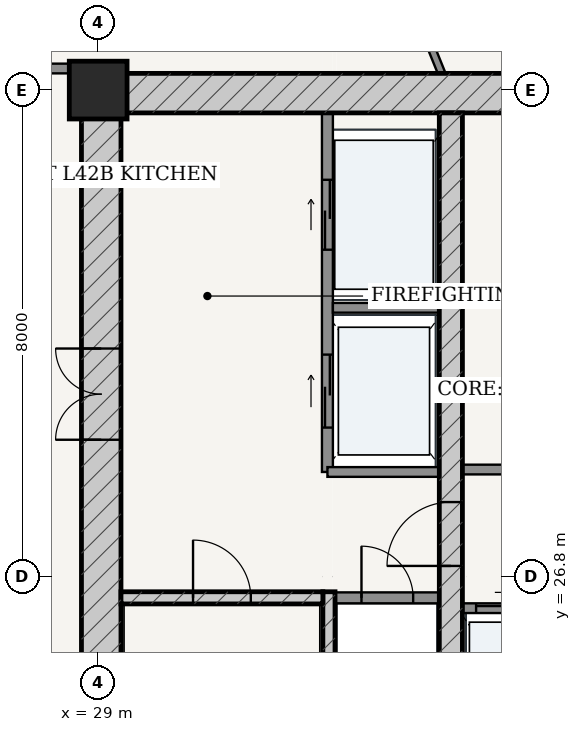
"""IFC4 building model, lengths in metres.
Left out: names, types, materials, properties, quantities, classifications, styles, units other than length and angle.
Written with IfcOpenShell. Run it as: python <this file> out.ifc"""

import sys

from ifc_helpers import new_model, si_unit, direction, frame, frame_2d, origin, origin_2d, place, context, subcontext, project, spatial, rectangle, extrude, source, transform, mapped, element, fill, save


model = new_model("IFC4")
c1 = context("Model", 3, precision=1e-05, world=origin(), true_north=direction((-0.2419218956, 0.970295726276)))
c2 = subcontext(c1, "Body", "Model", "MODEL_VIEW")
j1 = project(units=[si_unit("LENGTHUNIT", "METRE"), si_unit("PLANEANGLEUNIT", "RADIAN")], contexts=[c1])
p1 = place(None, origin())
s1 = spatial("IfcSite", under=j1, at=p1, CompositionType="ELEMENT")
p2 = place(p1, origin())
s2 = spatial("IfcBuilding", under=s1, at=p2, CompositionType="ELEMENT")
p3 = place(p2, frame((0.0, 0.0, 160.6)))
s3 = spatial("IfcBuildingStorey", under=s2, at=p3, CompositionType="ELEMENT", Elevation=160.6)
p4 = place(p3, frame((29.0, 34.8, 0.0), z_axis=(0.0, 0.0, 1.0), x_axis=(1.0, 0.0, 0.0)))
e1 = element("IfcColumn", 1, at=p4, inside=s3, PredefinedType="COLUMN", context=c2, shape_type="SweptSolid", body=[
    extrude(rectangle(XDim=0.95, YDim=0.95, at=origin_2d()), origin(), (0.0, 0.0, 1.0), 3.6),
])
p5 = place(p3, frame((28.725, 34.75, 0.0), z_axis=(0.0, 0.0, 1.0), x_axis=(1.0, 0.0, 0.0)))
e2 = element("IfcWall", 2, at=p5, inside=s3, PredefinedType="SHEAR", context=c2, shape_type="SweptSolid", body=[
    extrude(rectangle(XDim=18.55, YDim=0.65, at=frame_2d((9.275, 0.0))), origin(), (0.0, 0.0, 1.0), 3.33),
])
p6 = place(p3, frame((29.05, 19.175, 0.0), z_axis=(0.0, 0.0, 1.0), x_axis=(0.0, 1.0, 0.0)))
e3 = element("IfcWall", 3, at=p6, inside=s3, PredefinedType="SHEAR", context=c2, shape_type="SweptSolid", body=[
    extrude(rectangle(XDim=15.25, YDim=0.65, at=frame_2d((7.625, 0.0))), origin(), (0.0, 0.0, 1.0), 3.33),
])
p7 = place(p6, frame((9.875, 0.0, 0.0)))
e4 = element("IfcOpeningElement", 4, at=p7, cuts=e3, PredefinedType="OPENING", context=c2, shape_type="SweptSolid", body=[
    extrude(rectangle(XDim=1.5, YDim=2.2, at=frame_2d((0.75, 1.1))), frame((0.0, 0.335, 0.0), z_axis=(0.0, -1.0, 0.0), x_axis=(1.0, 0.0, 0.0)), (0.0, 0.0, 1.0), 0.67),
])
p8 = place(p3, frame((32.795, 19.175, 0.0), z_axis=(0.0, 0.0, 1.0), x_axis=(0.0, 1.0, 0.0)))
e5 = element("IfcWall", 5, at=p8, inside=s3, PredefinedType="SOLIDWALL", context=c2, shape_type="SweptSolid", body=[
    extrude(rectangle(XDim=7.375, YDim=0.2, at=frame_2d((3.688, 0.0))), origin(), (0.0, 0.0, 1.0), 3.33),
])
p9 = place(p3, frame((29.375, 26.45, 0.0), z_axis=(0.0, 0.0, 1.0), x_axis=(1.0, 0.0, 0.0)))
e6 = element("IfcWall", 6, at=p9, inside=s3, PredefinedType="SOLIDWALL", context=c2, shape_type="SweptSolid", body=[
    extrude(rectangle(XDim=3.32, YDim=0.2, at=frame_2d((1.66, 0.0))), origin(), (0.0, 0.0, 1.0), 3.33),
])
p10 = place(p9, frame((1.185, 0.0, 0.0)))
e7 = element("IfcOpeningElement", 7, at=p10, cuts=e6, PredefinedType="OPENING", context=c2, shape_type="SweptSolid", body=[
    extrude(rectangle(XDim=0.95, YDim=2.15, at=frame_2d((0.475, 1.075))), frame((0.0, 0.11, 0.0), z_axis=(0.0, -1.0, 0.0), x_axis=(1.0, 0.0, 0.0)), (0.0, 0.0, 1.0), 0.22),
])
p11 = place(p3, frame((34.8, 19.175, 0.0), z_axis=(0.0, 0.0, 1.0), x_axis=(0.0, 1.0, 0.0)))
e8 = element("IfcWall", 8, at=p11, inside=s3, PredefinedType="SHEAR", context=c2, shape_type="SweptSolid", body=[
    extrude(rectangle(XDim=15.25, YDim=0.38, at=frame_2d((7.625, 0.0))), origin(), (0.0, 0.0, 1.0), 3.33),
])
p12 = place(p11, frame((7.8, 0.0, 0.0)))
e9 = element("IfcOpeningElement", 9, at=p12, cuts=e8, PredefinedType="OPENING", context=c2, shape_type="SweptSolid", body=[
    extrude(rectangle(XDim=1.05, YDim=2.15, at=frame_2d((0.525, 1.075))), frame((0.0, 0.2, 0.0), z_axis=(0.0, -1.0, 0.0), x_axis=(1.0, 0.0, 0.0)), (0.0, 0.0, 1.0), 0.4),
])
p13 = place(p3, frame((32.9, 26.45, 0.0), z_axis=(0.0, 0.0, 1.0), x_axis=(1.0, 0.0, 0.0)))
e10 = element("IfcWall", 10, at=p13, inside=s3, PredefinedType="PARTITIONING", context=c2, shape_type="SweptSolid", body=[
    extrude(rectangle(XDim=1.71, YDim=0.18, at=frame_2d((0.855, 0.0))), origin(), (0.0, 0.0, 1.0), 3.33),
])
p14 = place(p13, frame((0.43, 0.0, 0.0)))
e11 = element("IfcOpeningElement", 11, at=p14, cuts=e10, PredefinedType="OPENING", context=c2, shape_type="SweptSolid", body=[
    extrude(rectangle(XDim=0.85, YDim=2.1, at=frame_2d((0.425, 1.05))), frame((0.0, 0.1, 0.0), z_axis=(0.0, -1.0, 0.0), x_axis=(1.0, 0.0, 0.0)), (0.0, 0.0, 1.0), 0.2),
])
p15 = place(p3, frame((32.77, 28.52, 0.0), z_axis=(0.0, 0.0, 1.0), x_axis=(0.0, 1.0, 0.0)))
e12 = element("IfcWall", 12, at=p15, inside=s3, PredefinedType="PARTITIONING", context=c2, shape_type="SweptSolid", body=[
    extrude(rectangle(XDim=5.905, YDim=0.18, at=frame_2d((2.953, 0.0))), origin(), (0.0, 0.0, 1.0), 3.33),
])
p16 = place(p15, frame((3.655, 0.0, 0.0)))
e13 = element("IfcOpeningElement", 13, at=p16, cuts=e12, PredefinedType="OPENING", context=c2, shape_type="SweptSolid", body=[
    extrude(rectangle(XDim=1.15, YDim=2.2, at=frame_2d((0.575, 1.1))), frame((0.0, 0.1, 0.0), z_axis=(0.0, -1.0, 0.0), x_axis=(1.0, 0.0, 0.0)), (0.0, 0.0, 1.0), 0.2),
])
p17 = place(p15, frame((0.73, 0.0, 0.0)))
e14 = element("IfcOpeningElement", 14, at=p17, cuts=e12, PredefinedType="OPENING", context=c2, shape_type="SweptSolid", body=[
    extrude(rectangle(XDim=1.2, YDim=2.25, at=frame_2d((0.6, 1.125))), frame((0.0, 0.1, 0.0), z_axis=(0.0, -1.0, 0.0), x_axis=(1.0, 0.0, 0.0)), (0.0, 0.0, 1.0), 0.2),
])
p18 = place(p3, frame((32.86, 31.22, 0.0), z_axis=(0.0, 0.0, 1.0), x_axis=(1.0, 0.0, 0.0)))
e15 = element("IfcWall", 15, at=p18, inside=s3, PredefinedType="PARTITIONING", context=c2, shape_type="SweptSolid", body=[
    extrude(rectangle(XDim=1.75, YDim=0.16, at=frame_2d((0.875, 0.0))), origin(), (0.0, 0.0, 1.0), 3.33),
])
p19 = place(p3, frame((32.77, 28.52, 0.0), z_axis=(0.0, 0.0, 1.0), x_axis=(1.0, 0.0, 0.0)))
e16 = element("IfcWall", 16, at=p19, inside=s3, PredefinedType="PARTITIONING", context=c2, shape_type="SweptSolid", body=[
    extrude(rectangle(XDim=1.84, YDim=0.16, at=frame_2d((0.92, 0.0))), origin(), (0.0, 0.0, 1.0), 3.33),
])
p20 = place(p3, frame((34.99, 28.56, 0.0), z_axis=(0.0, 0.0, 1.0), x_axis=(1.0, 0.0, 0.0)))
e17 = element("IfcWall", 17, at=p20, inside=s3, PredefinedType="PARTITIONING", context=c2, shape_type="SweptSolid", body=[
    extrude(rectangle(XDim=6.02, YDim=0.16, at=frame_2d((3.01, 0.0))), origin(), (0.0, 0.0, 1.0), 3.33),
])
p21 = place(p20, frame((2.585, 0.0, 0.0)))
e18 = element("IfcOpeningElement", 18, at=p21, cuts=e17, PredefinedType="OPENING", context=c2, shape_type="SweptSolid", body=[
    extrude(rectangle(XDim=0.85, YDim=2.1, at=frame_2d((0.425, 1.05))), frame((0.0, 0.09, 0.0), z_axis=(0.0, -1.0, 0.0), x_axis=(1.0, 0.0, 0.0)), (0.0, 0.0, 1.0), 0.18),
])
p22 = place(p3, frame((34.99, 26.28, 0.0), z_axis=(0.0, 0.0, 1.0), x_axis=(1.0, 0.0, 0.0)))
e19 = element("IfcWall", 19, at=p22, inside=s3, PredefinedType="PARTITIONING", context=c2, shape_type="SweptSolid", body=[
    extrude(rectangle(XDim=6.02, YDim=0.16, at=frame_2d((3.01, 0.0))), origin(), (0.0, 0.0, 1.0), 3.33),
])
p23 = place(p22, frame((0.225, 0.0, 0.0)))
e20 = element("IfcOpeningElement", 20, at=p23, cuts=e19, PredefinedType="OPENING", context=c2, shape_type="SweptSolid", body=[
    extrude(rectangle(XDim=1.1, YDim=2.2, at=frame_2d((0.55, 1.1))), frame((0.0, 0.09, 0.0), z_axis=(0.0, -1.0, 0.0), x_axis=(1.0, 0.0, 0.0)), (0.0, 0.0, 1.0), 0.18),
])
p24 = place(p22, frame((1.705, 0.0, 0.0)))
e21 = element("IfcOpeningElement", 21, at=p24, cuts=e19, PredefinedType="OPENING", context=c2, shape_type="SweptSolid", body=[
    extrude(rectangle(XDim=1.1, YDim=2.2, at=frame_2d((0.55, 1.1))), frame((0.0, 0.09, 0.0), z_axis=(0.0, -1.0, 0.0), x_axis=(1.0, 0.0, 0.0)), (0.0, 0.0, 1.0), 0.18),
])
p25 = place(p3, frame((26.795, 35.155, 0.0), z_axis=(0.0, 0.0, 1.0), x_axis=(1.0, 0.0, 0.0)))
e22 = element("IfcWall", 22, at=p25, inside=s3, PredefinedType="PARTITIONING", context=c2, shape_type="SweptSolid", body=[
    extrude(rectangle(XDim=1.93, YDim=0.16, at=frame_2d((0.965, 0.0))), origin(), (0.0, 0.0, 1.0), 2.776),
])
p26 = place(p3, frame((34.649, 35.075, 0.0), z_axis=(0.0, 0.0, 1.0), x_axis=(-0.37535719187, 0.926880239573, 0.0)))
e23 = element("IfcWall", 23, at=p26, inside=s3, PredefinedType="PARTITIONING", context=c2, shape_type="SweptSolid", body=[
    extrude(rectangle(XDim=2.916, YDim=0.12, at=frame_2d((1.458, 0.0))), origin(), (0.0, 0.0, 1.0), 3.33),
])
p27 = place(p26, frame((1.028, 0.0, 0.0)))
e24 = element("IfcOpeningElement", 24, at=p27, cuts=e23, PredefinedType="OPENING", context=c2, shape_type="SweptSolid", body=[
    extrude(rectangle(XDim=0.86, YDim=2.15, at=frame_2d((0.43, 1.075))), frame((0.0, 0.07, 0.0), z_axis=(0.0, -1.0, 0.0), x_axis=(1.0, 0.0, 0.0)), (0.0, 0.0, 1.0), 0.14),
])
m1 = source(origin(), c2, "Body", "SweptSolid", [
    extrude(rectangle(XDim=1.5, YDim=2.2, at=frame_2d((0.75, 1.1))), frame((0.0, 0.025, 0.0), z_axis=(0.0, -1.0, 0.0), x_axis=(1.0, 0.0, 0.0)), (0.0, 0.0, 1.0), 0.05),
])
p28 = place(p7, origin())
e25 = element("IfcDoor", 25, at=p28, inside=s3, OperationType="DOUBLE_DOOR_SINGLE_SWING", PredefinedType="DOOR", context=c2, shape_type="MappedRepresentation", body=[
    mapped(m1, transform((0.0, 0.0, 0.0), scale=1.0)),
])
fill(e4, e25)
m2 = source(origin(), c2, "Body", "SweptSolid", [
    extrude(rectangle(XDim=1.05, YDim=2.15, at=frame_2d((0.525, 1.075))), frame((0.0, 0.025, 0.0), z_axis=(0.0, -1.0, 0.0), x_axis=(1.0, 0.0, 0.0)), (0.0, 0.0, 1.0), 0.05),
])
p29 = place(p12, origin())
e26 = element("IfcDoor", 26, at=p29, inside=s3, OperationType="SINGLE_SWING_LEFT", PredefinedType="DOOR", context=c2, shape_type="MappedRepresentation", body=[
    mapped(m2, transform((0.0, 0.0, 0.0), scale=1.0)),
])
fill(e9, e26)
m3 = source(origin(), c2, "Body", "SweptSolid", [
    extrude(rectangle(XDim=0.95, YDim=2.15, at=frame_2d((0.475, 1.075))), frame((0.0, 0.025, 0.0), z_axis=(0.0, -1.0, 0.0), x_axis=(1.0, 0.0, 0.0)), (0.0, 0.0, 1.0), 0.05),
])
p30 = place(p10, origin())
e27 = element("IfcDoor", 27, at=p30, inside=s3, OperationType="SINGLE_SWING_LEFT", PredefinedType="DOOR", context=c2, shape_type="MappedRepresentation", body=[
    mapped(m3, transform((0.0, 0.0, 0.0), scale=1.0)),
])
fill(e7, e27)
m4 = source(origin(), c2, "Body", "SweptSolid", [
    extrude(rectangle(XDim=0.85, YDim=2.1, at=frame_2d((0.425, 1.05))), frame((0.0, 0.025, 0.0), z_axis=(0.0, -1.0, 0.0), x_axis=(1.0, 0.0, 0.0)), (0.0, 0.0, 1.0), 0.05),
])
p31 = place(p14, origin())
e28 = element("IfcDoor", 28, at=p31, inside=s3, OperationType="SINGLE_SWING_LEFT", PredefinedType="DOOR", context=c2, shape_type="MappedRepresentation", body=[
    mapped(m4, transform((0.0, 0.0, 0.0), scale=1.0)),
])
fill(e11, e28)
m5 = source(origin(), c2, "Body", "SweptSolid", [
    extrude(rectangle(XDim=1.15, YDim=2.2, at=frame_2d((0.575, 1.1))), frame((0.0, 0.025, 0.0), z_axis=(0.0, -1.0, 0.0), x_axis=(1.0, 0.0, 0.0)), (0.0, 0.0, 1.0), 0.05),
])
p32 = place(p16, origin())
e29 = element("IfcDoor", 29, at=p32, inside=s3, OperationType="DOUBLE_DOOR_SLIDING", PredefinedType="DOOR", context=c2, shape_type="MappedRepresentation", body=[
    mapped(m5, transform((0.0, 0.0, 0.0), scale=1.0)),
])
fill(e13, e29)
m6 = source(origin(), c2, "Body", "SweptSolid", [
    extrude(rectangle(XDim=1.2, YDim=2.25, at=frame_2d((0.6, 1.125))), frame((0.0, 0.025, 0.0), z_axis=(0.0, -1.0, 0.0), x_axis=(1.0, 0.0, 0.0)), (0.0, 0.0, 1.0), 0.05),
])
p33 = place(p17, origin())
e30 = element("IfcDoor", 30, at=p33, inside=s3, OperationType="DOUBLE_DOOR_SLIDING", PredefinedType="DOOR", context=c2, shape_type="MappedRepresentation", body=[
    mapped(m6, transform((0.0, 0.0, 0.0), scale=1.0)),
])
fill(e14, e30)
m7 = source(origin(), c2, "Body", "SweptSolid", [
    extrude(rectangle(XDim=1.1, YDim=2.2, at=frame_2d((0.55, 1.1))), frame((0.0, 0.025, 0.0), z_axis=(0.0, -1.0, 0.0), x_axis=(1.0, 0.0, 0.0)), (0.0, 0.0, 1.0), 0.05),
])
p34 = place(p23, origin())
e31 = element("IfcDoor", 31, at=p34, inside=s3, OperationType="DOUBLE_DOOR_SLIDING", PredefinedType="DOOR", context=c2, shape_type="MappedRepresentation", body=[
    mapped(m7, transform((0.0, 0.0, 0.0), scale=1.0)),
])
fill(e20, e31)
save(model, sys.argv[1])
